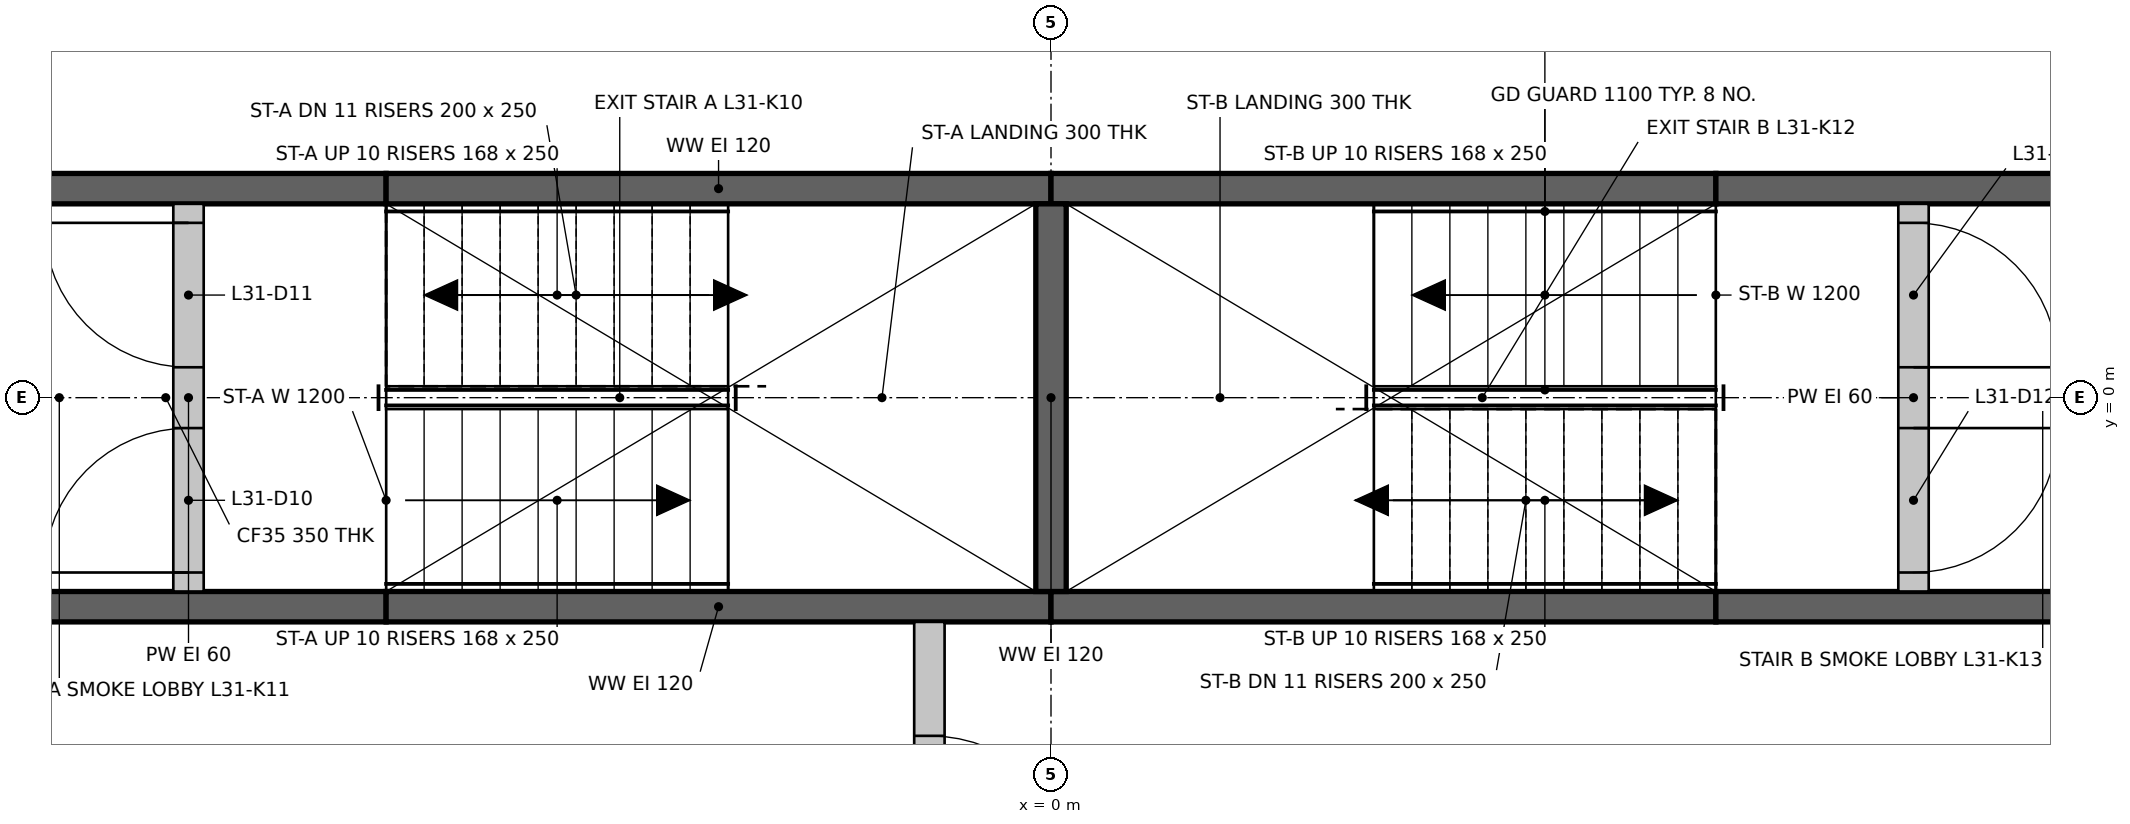
"""IFC4 building model, lengths in metres.
Left out: names, types, materials, properties, quantities, classifications, styles, units other than length and angle.
Written with IfcOpenShell. Run it as: python <this file> out.ifc"""

import sys

from ifc_helpers import new_model, si_unit, direction, frame, frame_2d, origin, place, context, subcontext, project, spatial, rectangle, extrude, element, fill, save


model = new_model("IFC4")
c1 = context("Model", 3, precision=1e-05, world=origin(), true_north=direction((0.0, 1.0)))
c2 = subcontext(c1, "Body", "Model", "MODEL_VIEW")
j1 = project(units=[si_unit("LENGTHUNIT", "METRE"), si_unit("PLANEANGLEUNIT", "RADIAN")], contexts=[c1])
p1 = place(None, origin())
s1 = spatial("IfcSite", under=j1, at=p1, CompositionType="ELEMENT")
p2 = place(p1, origin())
s2 = spatial("IfcBuilding", under=s1, at=p2, CompositionType="ELEMENT")
p3 = place(p2, frame((0.0, 0.0, 120.95)))
s3 = spatial("IfcBuildingStorey", under=s2, at=p3, CompositionType="ELEMENT", Elevation=120.95)
p4 = place(p3, frame((-7.274, -1.375, 0.0), z_axis=(0.0, 0.0, 1.0), x_axis=(1.0, 0.0, 0.0)))
e1 = element("IfcWall", 1, at=p4, inside=s3, PredefinedType="SHEAR", context=c2, shape_type="SweptSolid", body=[
    extrude(rectangle(XDim=2.9, YDim=0.2, at=frame_2d((1.45, 0.0))), origin(), (0.0, 0.0, 1.0), 3.0),
])
for number, where, z_axis, x_axis in (
    (2, (-4.374, -1.375, 0.0), (0.0, 0.0, 1.0), (1.0, 0.0, 0.0)),
    (3, (0.0, -1.375, 0.0), (0.0, 0.0, 1.0), (1.0, 0.0, 0.0)),
):
    element("IfcWall", number, at=place(p3, frame(where, z_axis=z_axis, x_axis=x_axis)), inside=s3, PredefinedType="SHEAR", context=c2, shape_type="SweptSolid", body=[
        extrude(rectangle(XDim=4.374, YDim=0.2, at=frame_2d((2.187, 0.0))), origin(), (0.0, 0.0, 1.0), 3.0),
    ])
for number, where, z_axis, x_axis in (
    (4, (4.374, -1.375, 0.0), (0.0, 0.0, 1.0), (1.0, 0.0, 0.0)),
    (5, (-7.274, 1.375, 0.0), (0.0, 0.0, 1.0), (1.0, 0.0, 0.0)),
):
    element("IfcWall", number, at=place(p3, frame(where, z_axis=z_axis, x_axis=x_axis)), inside=s3, PredefinedType="SHEAR", context=c2, shape_type="SweptSolid", body=[
        extrude(rectangle(XDim=2.9, YDim=0.2, at=frame_2d((1.45, 0.0))), origin(), (0.0, 0.0, 1.0), 3.0),
    ])
for number, where, z_axis, x_axis in (
    (6, (-4.374, 1.375, 0.0), (0.0, 0.0, 1.0), (1.0, 0.0, 0.0)),
    (7, (0.0, 1.375, 0.0), (0.0, 0.0, 1.0), (1.0, 0.0, 0.0)),
):
    element("IfcWall", number, at=place(p3, frame(where, z_axis=z_axis, x_axis=x_axis)), inside=s3, PredefinedType="SHEAR", context=c2, shape_type="SweptSolid", body=[
        extrude(rectangle(XDim=4.374, YDim=0.2, at=frame_2d((2.187, 0.0))), origin(), (0.0, 0.0, 1.0), 3.0),
    ])
p5 = place(p3, frame((4.374, 1.375, 0.0), z_axis=(0.0, 0.0, 1.0), x_axis=(1.0, 0.0, 0.0)))
e8 = element("IfcWall", 8, at=p5, inside=s3, PredefinedType="SHEAR", context=c2, shape_type="SweptSolid", body=[
    extrude(rectangle(XDim=2.9, YDim=0.2, at=frame_2d((1.45, 0.0))), origin(), (0.0, 0.0, 1.0), 3.0),
])
p6 = place(p3, frame((0.0, -1.275, 0.0), z_axis=(0.0, 0.0, 1.0), x_axis=(0.0, 1.0, 0.0)))
e9 = element("IfcWall", 9, at=p6, inside=s3, PredefinedType="SHEAR", context=c2, shape_type="SweptSolid", body=[
    extrude(rectangle(XDim=2.55, YDim=0.2, at=frame_2d((1.275, 0.0))), origin(), (0.0, 0.0, 1.0), 3.0),
])
p7 = place(p3, frame((-0.8, -3.974, 0.0), z_axis=(0.0, 0.0, 1.0), x_axis=(0.0, 1.0, 0.0)))
e10 = element("IfcWall", 10, at=p7, inside=s3, PredefinedType="PARTITIONING", context=c2, shape_type="SweptSolid", body=[
    extrude(rectangle(XDim=2.499, YDim=0.2, at=frame_2d((1.25, 0.0))), origin(), (0.0, 0.0, 1.0), 3.0),
])
p8 = place(p7, frame((0.75, 0.0, 0.0)))
e11 = element("IfcOpeningElement", 11, at=p8, cuts=e10, PredefinedType="OPENING", context=c2, shape_type="SweptSolid", body=[
    extrude(rectangle(XDim=1.0, YDim=2.1, at=frame_2d((0.5, 1.05))), frame((0.0, 0.11, 0.0), z_axis=(0.0, -1.0, 0.0), x_axis=(1.0, 0.0, 0.0)), (0.0, 0.0, 1.0), 0.22),
])
p9 = place(p3, frame((-5.674, -1.275, 0.0), z_axis=(0.0, 0.0, 1.0), x_axis=(0.0, 1.0, 0.0)))
e12 = element("IfcWall", 12, at=p9, inside=s3, PredefinedType="PARTITIONING", context=c2, shape_type="SweptSolid", body=[
    extrude(rectangle(XDim=2.55, YDim=0.2, at=frame_2d((1.275, 0.0))), origin(), (0.0, 0.0, 1.0), 3.0),
])
p10 = place(p9, frame((0.125, 0.0, 0.0)))
e13 = element("IfcOpeningElement", 13, at=p10, cuts=e12, PredefinedType="OPENING", context=c2, shape_type="SweptSolid", body=[
    extrude(rectangle(XDim=0.95, YDim=2.1, at=frame_2d((0.475, 1.05))), frame((0.0, 0.11, 0.0), z_axis=(0.0, -1.0, 0.0), x_axis=(1.0, 0.0, 0.0)), (0.0, 0.0, 1.0), 0.22),
])
p11 = place(p9, frame((1.475, 0.0, 0.0)))
e14 = element("IfcOpeningElement", 14, at=p11, cuts=e12, PredefinedType="OPENING", context=c2, shape_type="SweptSolid", body=[
    extrude(rectangle(XDim=0.95, YDim=2.1, at=frame_2d((0.475, 1.05))), frame((0.0, 0.11, 0.0), z_axis=(0.0, -1.0, 0.0), x_axis=(1.0, 0.0, 0.0)), (0.0, 0.0, 1.0), 0.22),
])
p12 = place(p3, frame((5.674, -1.275, 0.0), z_axis=(0.0, 0.0, 1.0), x_axis=(0.0, 1.0, 0.0)))
e15 = element("IfcWall", 15, at=p12, inside=s3, PredefinedType="PARTITIONING", context=c2, shape_type="SweptSolid", body=[
    extrude(rectangle(XDim=2.55, YDim=0.2, at=frame_2d((1.275, 0.0))), origin(), (0.0, 0.0, 1.0), 3.0),
])
p13 = place(p12, frame((0.125, 0.0, 0.0)))
e16 = element("IfcOpeningElement", 16, at=p13, cuts=e15, PredefinedType="OPENING", context=c2, shape_type="SweptSolid", body=[
    extrude(rectangle(XDim=0.95, YDim=2.1, at=frame_2d((0.475, 1.05))), frame((0.0, 0.11, 0.0), z_axis=(0.0, -1.0, 0.0), x_axis=(1.0, 0.0, 0.0)), (0.0, 0.0, 1.0), 0.22),
])
p14 = place(p12, frame((1.475, 0.0, 0.0)))
e17 = element("IfcOpeningElement", 17, at=p14, cuts=e15, PredefinedType="OPENING", context=c2, shape_type="SweptSolid", body=[
    extrude(rectangle(XDim=0.95, YDim=2.1, at=frame_2d((0.475, 1.05))), frame((0.0, 0.11, 0.0), z_axis=(0.0, -1.0, 0.0), x_axis=(1.0, 0.0, 0.0)), (0.0, 0.0, 1.0), 0.22),
])
p15 = place(p10, origin())
e18 = element("IfcDoor", 18, at=p15, inside=s3, OperationType="SINGLE_SWING_LEFT", PredefinedType="DOOR", context=c2, shape_type="SweptSolid", body=[
    extrude(rectangle(XDim=0.95, YDim=2.1, at=frame_2d((0.475, 1.05))), frame((0.0, 0.025, 0.0), z_axis=(0.0, -1.0, 0.0), x_axis=(1.0, 0.0, 0.0)), (0.0, 0.0, 1.0), 0.05),
])
fill(e13, e18)
p16 = place(p11, origin())
e19 = element("IfcDoor", 19, at=p16, inside=s3, OperationType="SINGLE_SWING_RIGHT", PredefinedType="DOOR", context=c2, shape_type="SweptSolid", body=[
    extrude(rectangle(XDim=0.95, YDim=2.1, at=frame_2d((0.475, 1.05))), frame((0.0, 0.025, 0.0), z_axis=(0.0, -1.0, 0.0), x_axis=(1.0, 0.0, 0.0)), (0.0, 0.0, 1.0), 0.05),
])
fill(e14, e19)
p17 = place(p13, frame((0.95, 0.0, 0.0), z_axis=(0.0, 0.0, 1.0), x_axis=(-1.0, 0.0, 0.0)))
e20 = element("IfcDoor", 20, at=p17, inside=s3, OperationType="SINGLE_SWING_RIGHT", PredefinedType="DOOR", context=c2, shape_type="SweptSolid", body=[
    extrude(rectangle(XDim=0.95, YDim=2.1, at=frame_2d((0.475, 1.05))), frame((0.0, 0.025, 0.0), z_axis=(0.0, -1.0, 0.0), x_axis=(1.0, 0.0, 0.0)), (0.0, 0.0, 1.0), 0.05),
])
fill(e16, e20)
p18 = place(p14, frame((0.95, 0.0, 0.0), z_axis=(0.0, 0.0, 1.0), x_axis=(-1.0, 0.0, 0.0)))
e21 = element("IfcDoor", 21, at=p18, inside=s3, OperationType="SINGLE_SWING_LEFT", PredefinedType="DOOR", context=c2, shape_type="SweptSolid", body=[
    extrude(rectangle(XDim=0.95, YDim=2.1, at=frame_2d((0.475, 1.05))), frame((0.0, 0.025, 0.0), z_axis=(0.0, -1.0, 0.0), x_axis=(1.0, 0.0, 0.0)), (0.0, 0.0, 1.0), 0.05),
])
fill(e17, e21)
p19 = place(p8, frame((1.0, 0.0, 0.0), z_axis=(0.0, 0.0, 1.0), x_axis=(-1.0, 0.0, 0.0)))
e22 = element("IfcDoor", 22, at=p19, inside=s3, OperationType="SINGLE_SWING_LEFT", PredefinedType="DOOR", context=c2, shape_type="SweptSolid", body=[
    extrude(rectangle(XDim=1.0, YDim=2.1, at=frame_2d((0.5, 1.05))), frame((0.0, 0.025, 0.0), z_axis=(0.0, -1.0, 0.0), x_axis=(1.0, 0.0, 0.0)), (0.0, 0.0, 1.0), 0.05),
])
fill(e11, e22)
save(model, sys.argv[1])
